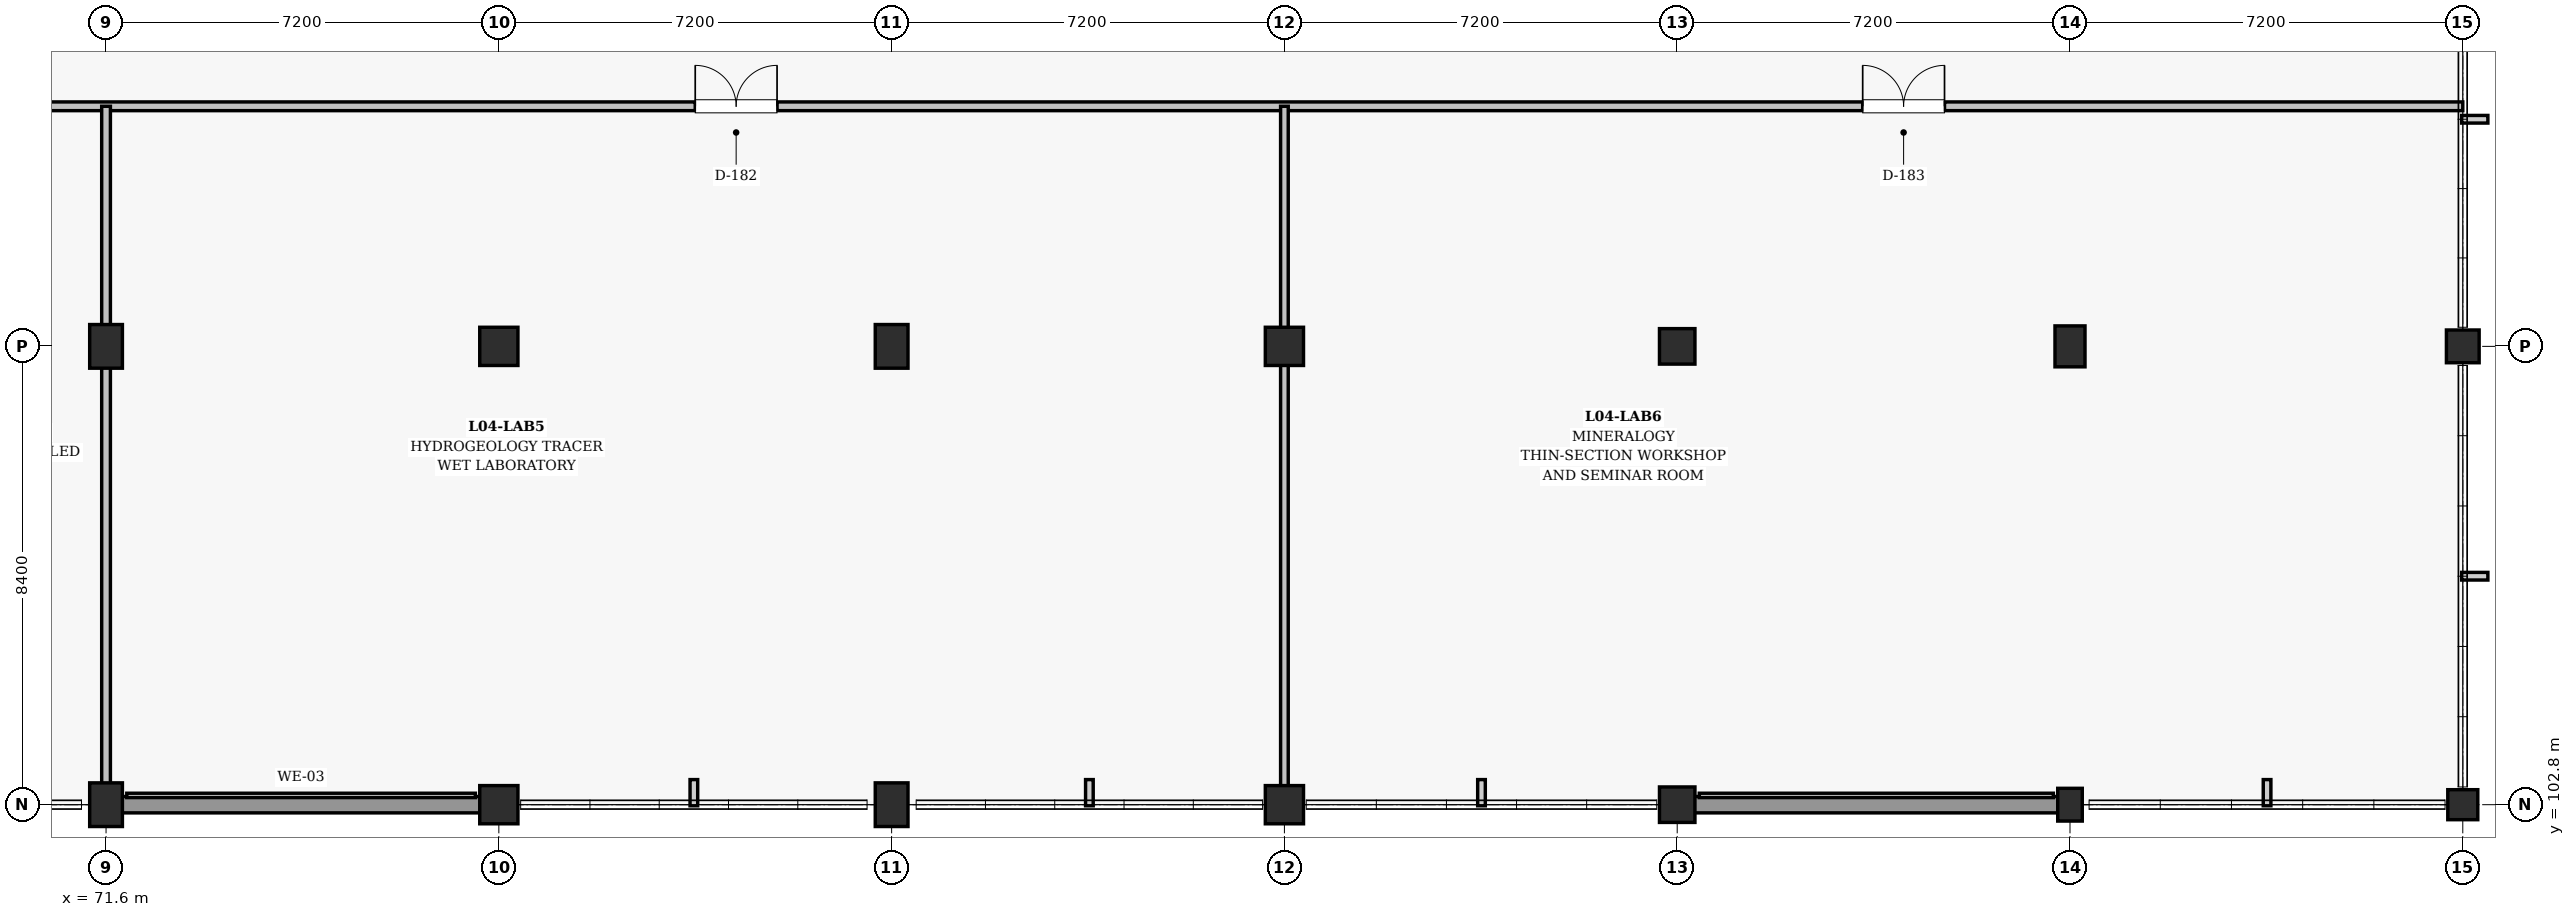
"""IFC4 building model, lengths in metres.
Left out: names, types, materials, properties, quantities, classifications, styles, units other than length and angle.
Written with IfcOpenShell. Run it as: python <this file> out.ifc"""

import sys

from ifc_helpers import new_model, si_unit, direction, frame, frame_2d, origin, origin_2d, place, context, subcontext, project, spatial, rectangle, extrude, element, fill, save


model = new_model("IFC4")
c1 = context("Model", 3, precision=1e-05, world=origin(), true_north=direction((0.0, 1.0)))
c2 = subcontext(c1, "Body", "Model", "MODEL_VIEW")
j1 = project(units=[si_unit("LENGTHUNIT", "METRE"), si_unit("PLANEANGLEUNIT", "RADIAN")], contexts=[c1])
p1 = place(None, origin())
s1 = spatial("IfcSite", under=j1, at=p1, CompositionType="ELEMENT")
p2 = place(p1, origin())
s2 = spatial("IfcBuilding", under=s1, at=p2, CompositionType="ELEMENT")
p3 = place(p2, frame((0.0, 0.0, 18.9)))
s3 = spatial("IfcBuildingStorey", under=s2, at=p3, CompositionType="ELEMENT", Elevation=18.9)
for number, where, z_axis, x_axis in (
    (1, (71.6, 102.8, 0.0), (0.0, 0.0, 1.0), (1.0, 0.0, 0.0)),
    (2, (71.6, 111.2, 0.0), (0.0, 0.0, 1.0), (1.0, 0.0, 0.0)),
):
    element("IfcColumn", number, at=place(p3, frame(where, z_axis=z_axis, x_axis=x_axis)), inside=s3, PredefinedType="COLUMN", context=c2, shape_type="SweptSolid", body=[
        extrude(rectangle(XDim=0.6, YDim=0.8, at=origin_2d()), origin(), (0.0, 0.0, 1.0), 4.5),
    ])
for number, where, z_axis, x_axis in (
    (3, (78.8, 102.8, 0.0), (0.0, 0.0, 1.0), (1.0, 0.0, 0.0)),
    (4, (78.8, 111.2, 0.0), (0.0, 0.0, 1.0), (1.0, 0.0, 0.0)),
):
    element("IfcColumn", number, at=place(p3, frame(where, z_axis=z_axis, x_axis=x_axis)), inside=s3, PredefinedType="COLUMN", context=c2, shape_type="SweptSolid", body=[
        extrude(rectangle(XDim=0.7, YDim=0.7, at=origin_2d()), origin(), (0.0, 0.0, 1.0), 4.5),
    ])
for number, where, z_axis, x_axis in (
    (5, (86.0, 102.8, 0.0), (0.0, 0.0, 1.0), (1.0, 0.0, 0.0)),
    (6, (86.0, 111.2, 0.0), (0.0, 0.0, 1.0), (1.0, 0.0, 0.0)),
):
    element("IfcColumn", number, at=place(p3, frame(where, z_axis=z_axis, x_axis=x_axis)), inside=s3, PredefinedType="COLUMN", context=c2, shape_type="SweptSolid", body=[
        extrude(rectangle(XDim=0.6, YDim=0.8, at=origin_2d()), origin(), (0.0, 0.0, 1.0), 4.5),
    ])
for number, where, z_axis, x_axis in (
    (7, (93.2, 102.8, 0.0), (0.0, 0.0, 1.0), (1.0, 0.0, 0.0)),
    (8, (93.2, 111.2, 0.0), (0.0, 0.0, 1.0), (1.0, 0.0, 0.0)),
):
    element("IfcColumn", number, at=place(p3, frame(where, z_axis=z_axis, x_axis=x_axis)), inside=s3, PredefinedType="COLUMN", context=c2, shape_type="SweptSolid", body=[
        extrude(rectangle(XDim=0.7, YDim=0.7, at=origin_2d()), origin(), (0.0, 0.0, 1.0), 4.5),
    ])
for number, where, z_axis, x_axis in (
    (9, (100.4, 102.8, 0.0), (0.0, 0.0, 1.0), (1.0, 0.0, 0.0)),
    (10, (100.4, 111.2, 0.0), (0.0, 0.0, 1.0), (1.0, 0.0, 0.0)),
):
    element("IfcColumn", number, at=place(p3, frame(where, z_axis=z_axis, x_axis=x_axis)), inside=s3, PredefinedType="COLUMN", context=c2, shape_type="SweptSolid", body=[
        extrude(rectangle(XDim=0.65, YDim=0.65, at=origin_2d()), origin(), (0.0, 0.0, 1.0), 4.5),
    ])
p4 = place(p3, frame((107.6, 102.8, 0.0), z_axis=(0.0, 0.0, 1.0), x_axis=(1.0, 0.0, 0.0)))
e11 = element("IfcColumn", 11, at=p4, inside=s3, PredefinedType="COLUMN", context=c2, shape_type="SweptSolid", body=[
    extrude(rectangle(XDim=0.45, YDim=0.6, at=origin_2d()), origin(), (0.0, 0.0, 1.0), 4.5),
])
p5 = place(p3, frame((107.6, 111.2, 0.0), z_axis=(0.0, 0.0, 1.0), x_axis=(1.0, 0.0, 0.0)))
e12 = element("IfcColumn", 12, at=p5, inside=s3, PredefinedType="COLUMN", context=c2, shape_type="SweptSolid", body=[
    extrude(rectangle(XDim=0.55, YDim=0.75, at=origin_2d()), origin(), (0.0, 0.0, 1.0), 4.5),
])
p6 = place(p3, frame((114.8, 102.8, 0.0), z_axis=(0.0, 0.0, 1.0), x_axis=(1.0, 0.0, 0.0)))
e13 = element("IfcColumn", 13, at=p6, inside=s3, PredefinedType="COLUMN", context=c2, shape_type="SweptSolid", body=[
    extrude(rectangle(XDim=0.55, YDim=0.55, at=origin_2d()), origin(), (0.0, 0.0, 1.0), 4.5),
])
p7 = place(p3, frame((114.8, 111.2, 0.0), z_axis=(0.0, 0.0, 1.0), x_axis=(1.0, 0.0, 0.0)))
e14 = element("IfcColumn", 14, at=p7, inside=s3, PredefinedType="COLUMN", context=c2, shape_type="SweptSolid", body=[
    extrude(rectangle(XDim=0.6, YDim=0.6, at=origin_2d()), origin(), (0.0, 0.0, 1.0), 4.5),
])
p8 = place(p3, frame((71.88, 102.8, 0.0), z_axis=(0.0, 0.0, 1.0), x_axis=(1.0, 0.0, 0.0)))
e15 = element("IfcWall", 15, at=p8, inside=s3, PredefinedType="SOLIDWALL", context=c2, shape_type="SweptSolid", body=[
    extrude(rectangle(XDim=6.59, YDim=0.3, at=frame_2d((3.295, 0.0))), origin(), (0.0, 0.0, 1.0), 2.955),
])
p9 = place(p3, frame((100.705, 102.8, 0.0), z_axis=(0.0, 0.0, 1.0), x_axis=(1.0, 0.0, 0.0)))
e16 = element("IfcWall", 16, at=p9, inside=s3, PredefinedType="SOLIDWALL", context=c2, shape_type="SweptSolid", body=[
    extrude(rectangle(XDim=6.69, YDim=0.3, at=frame_2d((3.345, 0.0))), origin(), (0.0, 0.0, 1.0), 2.955),
])
p10 = place(p3, frame((14.0, 115.6, 0.0), z_axis=(0.0, 0.0, 1.0), x_axis=(1.0, 0.0, 0.0)))
e17 = element("IfcWall", 17, at=p10, inside=s3, PredefinedType="PARTITIONING", context=c2, shape_type="SweptSolid", body=[
    extrude(rectangle(XDim=100.8, YDim=0.16, at=frame_2d((50.4, 0.0))), origin(), (0.0, 0.0, 1.0), 2.96),
])
p11 = place(p10, frame((29.9, 0.0, 0.0)))
e18 = element("IfcOpeningElement", 18, at=p11, cuts=e17, PredefinedType="OPENING", context=c2, shape_type="SweptSolid", body=[
    extrude(rectangle(XDim=1.0, YDim=2.15, at=frame_2d((0.5, 1.075))), frame((0.0, 0.09, 0.0), z_axis=(0.0, -1.0, 0.0), x_axis=(1.0, 0.0, 0.0)), (0.0, 0.0, 1.0), 0.18),
])
p12 = place(p10, frame((11.0, 0.0, 0.0)))
e19 = element("IfcOpeningElement", 19, at=p12, cuts=e17, PredefinedType="OPENING", context=c2, shape_type="SweptSolid", body=[
    extrude(rectangle(XDim=1.5, YDim=2.25, at=frame_2d((0.75, 1.125))), frame((0.0, 0.09, 0.0), z_axis=(0.0, -1.0, 0.0), x_axis=(1.0, 0.0, 0.0)), (0.0, 0.0, 1.0), 0.18),
])
p13 = place(p10, frame((25.4, 0.0, 0.0)))
e20 = element("IfcOpeningElement", 20, at=p13, cuts=e17, PredefinedType="OPENING", context=c2, shape_type="SweptSolid", body=[
    extrude(rectangle(XDim=1.18, YDim=2.2, at=frame_2d((0.59, 1.1))), frame((0.0, 0.09, 0.0), z_axis=(0.0, -1.0, 0.0), x_axis=(1.0, 0.0, 0.0)), (0.0, 0.0, 1.0), 0.18),
])
p14 = place(p10, frame((34.4, 0.0, 0.0)))
e21 = element("IfcOpeningElement", 21, at=p14, cuts=e17, PredefinedType="OPENING", context=c2, shape_type="SweptSolid", body=[
    extrude(rectangle(XDim=1.25, YDim=2.2, at=frame_2d((0.625, 1.1))), frame((0.0, 0.09, 0.0), z_axis=(0.0, -1.0, 0.0), x_axis=(1.0, 0.0, 0.0)), (0.0, 0.0, 1.0), 0.18),
])
p15 = place(p10, frame((47.7, 0.0, 0.0)))
e22 = element("IfcOpeningElement", 22, at=p15, cuts=e17, PredefinedType="OPENING", context=c2, shape_type="SweptSolid", body=[
    extrude(rectangle(XDim=2.05, YDim=2.3, at=frame_2d((1.025, 1.15))), frame((0.0, 0.09, 0.0), z_axis=(0.0, -1.0, 0.0), x_axis=(1.0, 0.0, 0.0)), (0.0, 0.0, 1.0), 0.18),
])
p16 = place(p10, frame((68.4, 0.0, 0.0)))
e23 = element("IfcOpeningElement", 23, at=p16, cuts=e17, PredefinedType="OPENING", context=c2, shape_type="SweptSolid", body=[
    extrude(rectangle(XDim=1.5, YDim=2.25, at=frame_2d((0.75, 1.125))), frame((0.0, 0.09, 0.0), z_axis=(0.0, -1.0, 0.0), x_axis=(1.0, 0.0, 0.0)), (0.0, 0.0, 1.0), 0.18),
])
p17 = place(p10, frame((89.8, 0.0, 0.0)))
e24 = element("IfcOpeningElement", 24, at=p17, cuts=e17, PredefinedType="OPENING", context=c2, shape_type="SweptSolid", body=[
    extrude(rectangle(XDim=1.5, YDim=2.25, at=frame_2d((0.75, 1.125))), frame((0.0, 0.09, 0.0), z_axis=(0.0, -1.0, 0.0), x_axis=(1.0, 0.0, 0.0)), (0.0, 0.0, 1.0), 0.18),
])
p18 = place(p3, frame((71.6, 102.8, 0.0), z_axis=(0.0, 0.0, 1.0), x_axis=(0.0, 1.0, 0.0)))
e25 = element("IfcWall", 25, at=p18, inside=s3, PredefinedType="PARTITIONING", context=c2, shape_type="SweptSolid", body=[
    extrude(rectangle(XDim=12.8, YDim=0.16, at=frame_2d((6.4, 0.0))), origin(), (0.0, 0.0, 1.0), 2.96),
])
p19 = place(p3, frame((93.2, 102.8, 0.0), z_axis=(0.0, 0.0, 1.0), x_axis=(0.0, 1.0, 0.0)))
e26 = element("IfcWall", 26, at=p19, inside=s3, PredefinedType="PARTITIONING", context=c2, shape_type="SweptSolid", body=[
    extrude(rectangle(XDim=12.8, YDim=0.14, at=frame_2d((6.4, 0.0))), origin(), (0.0, 0.0, 1.0), 3.36),
])
p20 = place(p16, origin())
e27 = element("IfcDoor", 27, at=p20, inside=s3, OperationType="DOUBLE_DOOR_SINGLE_SWING", PredefinedType="DOOR", context=c2, shape_type="SweptSolid", body=[
    extrude(rectangle(XDim=1.5, YDim=2.25, at=frame_2d((0.75, 1.125))), frame((0.0, 0.025, 0.0), z_axis=(0.0, -1.0, 0.0), x_axis=(1.0, 0.0, 0.0)), (0.0, 0.0, 1.0), 0.05),
])
fill(e23, e27)
p21 = place(p17, origin())
e28 = element("IfcDoor", 28, at=p21, inside=s3, OperationType="DOUBLE_DOOR_SINGLE_SWING", PredefinedType="DOOR", context=c2, shape_type="SweptSolid", body=[
    extrude(rectangle(XDim=1.5, YDim=2.25, at=frame_2d((0.75, 1.125))), frame((0.0, 0.025, 0.0), z_axis=(0.0, -1.0, 0.0), x_axis=(1.0, 0.0, 0.0)), (0.0, 0.0, 1.0), 0.05),
])
fill(e24, e28)
save(model, sys.argv[1])
